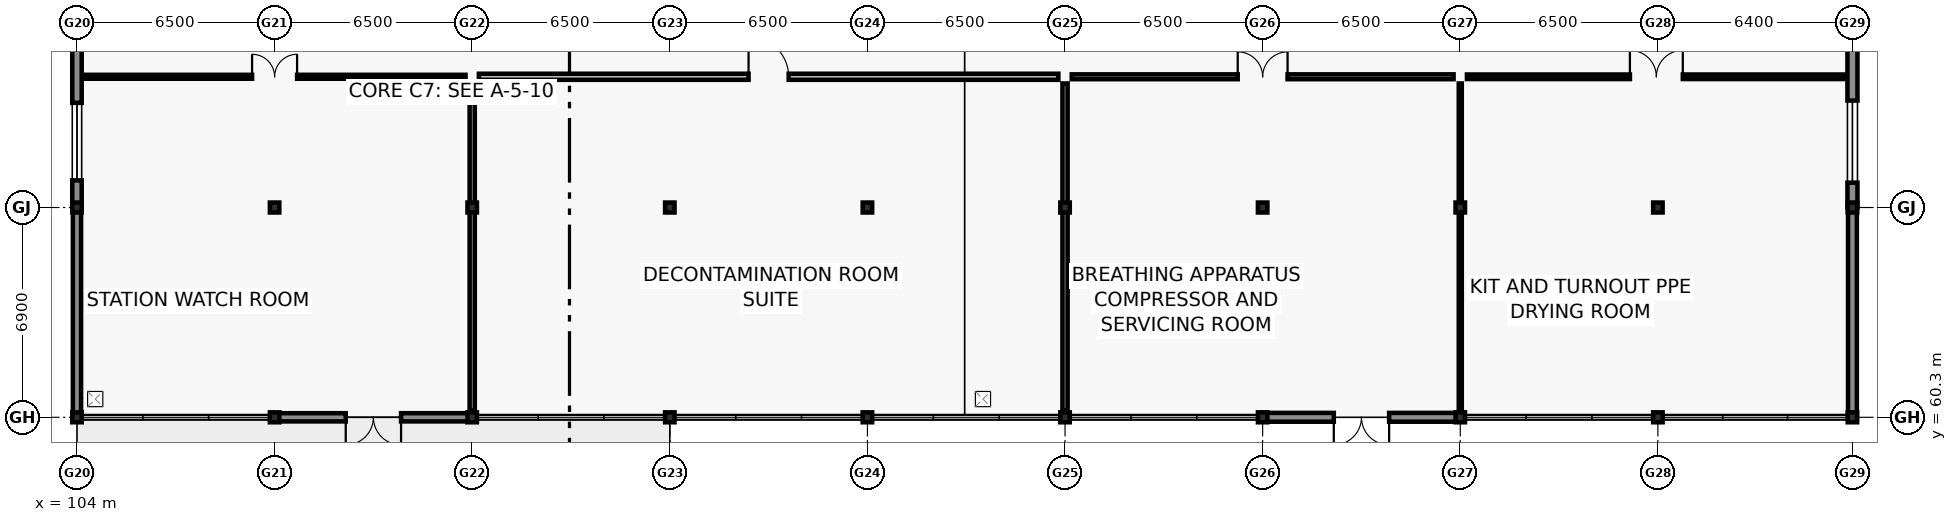
"""IFC4 building model, lengths in metres.
Left out: names, types, materials, properties, quantities, classifications, styles, units other than length and angle.
Written with IfcOpenShell. Run it as: python <this file> out.ifc"""

import sys

from ifc_helpers import new_model, si_unit, direction, frame, frame_2d, origin, origin_2d, place, context, subcontext, project, spatial, rectangle, i_section, extrude, element, fill, save


model = new_model("IFC4")
c1 = context("Model", 3, precision=1e-05, world=origin(), true_north=direction((0.0, 1.0)))
c2 = subcontext(c1, "Body", "Model", "MODEL_VIEW")
j1 = project(units=[si_unit("LENGTHUNIT", "METRE"), si_unit("PLANEANGLEUNIT", "RADIAN")], contexts=[c1])
p1 = place(None, origin())
s1 = spatial("IfcSite", under=j1, at=p1, CompositionType="ELEMENT")
p2 = place(p1, origin())
s2 = spatial("IfcBuilding", under=s1, at=p2, CompositionType="ELEMENT")
p3 = place(p2, origin())
s3 = spatial("IfcBuildingStorey", under=s2, at=p3, CompositionType="ELEMENT", Elevation=0.0)
for number, where, z_axis, x_axis in (
    (1, (104.0, 60.3, 0.0), (0.0, 0.0, 1.0), (1.0, 0.0, 0.0)),
    (2, (104.0, 67.2, 0.0), (0.0, 0.0, 1.0), (1.0, 0.0, 0.0)),
    (3, (110.5, 60.3, 0.0), (0.0, 0.0, 1.0), (1.0, 0.0, 0.0)),
    (4, (110.5, 67.2, 0.0), (0.0, 0.0, 1.0), (1.0, 0.0, 0.0)),
    (5, (117.0, 60.3, 0.0), (0.0, 0.0, 1.0), (1.0, 0.0, 0.0)),
    (6, (117.0, 67.2, 0.0), (0.0, 0.0, 1.0), (1.0, 0.0, 0.0)),
    (7, (123.5, 60.3, 0.0), (0.0, 0.0, 1.0), (1.0, 0.0, 0.0)),
    (8, (123.5, 67.2, 0.0), (0.0, 0.0, 1.0), (1.0, 0.0, 0.0)),
    (9, (130.0, 60.3, 0.0), (0.0, 0.0, 1.0), (1.0, 0.0, 0.0)),
    (10, (130.0, 67.2, 0.0), (0.0, 0.0, 1.0), (1.0, 0.0, 0.0)),
    (11, (136.5, 60.3, 0.0), (0.0, 0.0, 1.0), (1.0, 0.0, 0.0)),
    (12, (136.5, 67.2, 0.0), (0.0, 0.0, 1.0), (1.0, 0.0, 0.0)),
    (13, (143.0, 60.3, 0.0), (0.0, 0.0, 1.0), (1.0, 0.0, 0.0)),
    (14, (143.0, 67.2, 0.0), (0.0, 0.0, 1.0), (1.0, 0.0, 0.0)),
    (15, (149.5, 60.3, 0.0), (0.0, 0.0, 1.0), (1.0, 0.0, 0.0)),
    (16, (149.5, 67.2, 0.0), (0.0, 0.0, 1.0), (1.0, 0.0, 0.0)),
    (17, (156.0, 60.3, 0.0), (0.0, 0.0, 1.0), (1.0, 0.0, 0.0)),
    (18, (156.0, 67.2, 0.0), (0.0, 0.0, 1.0), (1.0, 0.0, 0.0)),
    (19, (162.4, 60.3, 0.0), (0.0, 0.0, 1.0), (1.0, 0.0, 0.0)),
    (20, (162.4, 67.2, 0.0), (0.0, 0.0, 1.0), (1.0, 0.0, 0.0)),
):
    element("IfcColumn", number, at=place(p3, frame(where, z_axis=z_axis, x_axis=x_axis)), inside=s3, PredefinedType="COLUMN", context=c2, shape_type="SweptSolid", body=[
        extrude(i_section(OverallWidth=0.311, OverallDepth=0.327, WebThickness=0.016, FlangeThickness=0.025, FilletRadius=0.017, at=origin_2d()), origin(), (0.0, 0.0, 1.0), 5.4),
    ])
p4 = place(p3, frame((116.995, 60.3, 0.0), z_axis=(0.0, 0.0, 1.0), x_axis=(-1.0, 0.0, 0.0)))
e21 = element("IfcWall", 21, at=p4, inside=s3, PredefinedType="SOLIDWALL", context=c2, shape_type="SweptSolid", body=[
    extrude(rectangle(XDim=6.49, YDim=0.27, at=frame_2d((3.245, 0.0))), origin(), (0.0, 0.0, 1.0), 4.52),
])
p5 = place(p4, frame((2.335, 0.0, 0.0)))
e22 = element("IfcOpeningElement", 22, at=p5, cuts=e21, PredefinedType="OPENING", context=c2, shape_type="SweptSolid", body=[
    extrude(rectangle(XDim=1.82, YDim=2.2, at=frame_2d((0.91, 1.1))), frame((0.0, 0.145, 0.0), z_axis=(0.0, -1.0, 0.0), x_axis=(1.0, 0.0, 0.0)), (0.0, 0.0, 1.0), 0.29),
])
p6 = place(p3, frame((149.495, 60.3, 0.0), z_axis=(0.0, 0.0, 1.0), x_axis=(-1.0, 0.0, 0.0)))
e23 = element("IfcWall", 23, at=p6, inside=s3, PredefinedType="SOLIDWALL", context=c2, shape_type="SweptSolid", body=[
    extrude(rectangle(XDim=6.49, YDim=0.29, at=frame_2d((3.245, 0.0))), origin(), (0.0, 0.0, 1.0), 4.52),
])
p7 = place(p6, frame((2.335, 0.0, 0.0)))
e24 = element("IfcOpeningElement", 24, at=p7, cuts=e23, PredefinedType="OPENING", context=c2, shape_type="SweptSolid", body=[
    extrude(rectangle(XDim=1.82, YDim=2.2, at=frame_2d((0.91, 1.1))), frame((0.0, 0.155, 0.0), z_axis=(0.0, -1.0, 0.0), x_axis=(1.0, 0.0, 0.0)), (0.0, 0.0, 1.0), 0.31),
])
p8 = place(p3, frame((104.0, 60.305, 0.0), z_axis=(0.0, 0.0, 1.0), x_axis=(0.0, 1.0, 0.0)))
e25 = element("IfcWall", 25, at=p8, inside=s3, PredefinedType="SOLIDWALL", context=c2, shape_type="SweptSolid", body=[
    extrude(rectangle(XDim=6.89, YDim=0.27, at=frame_2d((3.445, 0.0))), origin(), (0.0, 0.0, 1.0), 4.52),
])
p9 = place(p3, frame((162.4, 67.195, 0.0), z_axis=(0.0, 0.0, 1.0), x_axis=(0.0, -1.0, 0.0)))
e26 = element("IfcWall", 26, at=p9, inside=s3, PredefinedType="SOLIDWALL", context=c2, shape_type="SweptSolid", body=[
    extrude(rectangle(XDim=6.89, YDim=0.29, at=frame_2d((3.445, 0.0))), origin(), (0.0, 0.0, 1.0), 4.52),
])
p10 = place(p3, frame((104.0, 67.205, 0.0), z_axis=(0.0, 0.0, 1.0), x_axis=(0.0, 1.0, 0.0)))
e27 = element("IfcWall", 27, at=p10, inside=s3, PredefinedType="SOLIDWALL", context=c2, shape_type="SweptSolid", body=[
    extrude(rectangle(XDim=6.89, YDim=0.31, at=frame_2d((3.445, 0.0))), origin(), (0.0, 0.0, 1.0), 4.52),
])
p11 = place(p10, frame((0.887, 0.0, 0.8)))
e28 = element("IfcOpeningElement", 28, at=p11, cuts=e27, PredefinedType="OPENING", context=c2, shape_type="SweptSolid", body=[
    extrude(rectangle(XDim=2.55, YDim=2.1, at=frame_2d((1.275, 1.05))), frame((0.0, 0.165, 0.0), z_axis=(0.0, -1.0, 0.0), x_axis=(1.0, 0.0, 0.0)), (0.0, 0.0, 1.0), 0.33),
])
p12 = place(p3, frame((162.4, 74.095, 0.0), z_axis=(0.0, 0.0, 1.0), x_axis=(0.0, -1.0, 0.0)))
e29 = element("IfcWall", 29, at=p12, inside=s3, PredefinedType="SOLIDWALL", context=c2, shape_type="SweptSolid", body=[
    extrude(rectangle(XDim=6.89, YDim=0.33, at=frame_2d((3.445, 0.0))), origin(), (0.0, 0.0, 1.0), 4.52),
])
p13 = place(p12, frame((3.377, 0.0, 0.8)))
e30 = element("IfcOpeningElement", 30, at=p13, cuts=e29, PredefinedType="OPENING", context=c2, shape_type="SweptSolid", body=[
    extrude(rectangle(XDim=2.7, YDim=2.1, at=frame_2d((1.35, 1.05))), frame((0.0, 0.175, 0.0), z_axis=(0.0, -1.0, 0.0), x_axis=(1.0, 0.0, 0.0)), (0.0, 0.0, 1.0), 0.35),
])
p14 = place(p3, frame((117.0, 60.52, 0.0), z_axis=(0.0, 0.0, 1.0), x_axis=(0.0, 1.0, 0.0)))
e31 = element("IfcWall", 31, at=p14, inside=s3, PredefinedType="PARTITIONING", context=c2, shape_type="SweptSolid", body=[
    extrude(rectangle(XDim=10.76, YDim=0.17, at=frame_2d((5.38, 0.0))), origin(), (0.0, 0.0, 1.0), 4.5),
])
p15 = place(p3, frame((104.22, 71.5, 0.0), z_axis=(0.0, 0.0, 1.0), x_axis=(1.0, 0.0, 0.0)))
e32 = element("IfcWall", 32, at=p15, inside=s3, PredefinedType="PARTITIONING", context=c2, shape_type="SweptSolid", body=[
    extrude(rectangle(XDim=12.56, YDim=0.13, at=frame_2d((6.28, 0.0))), origin(), (0.0, 0.0, 1.0), 4.5),
])
p16 = place(p15, frame((5.54, 0.0, 0.0)))
e33 = element("IfcOpeningElement", 33, at=p16, cuts=e32, PredefinedType="OPENING", context=c2, shape_type="SweptSolid", body=[
    extrude(rectangle(XDim=1.48, YDim=2.18, at=frame_2d((0.74, 1.09))), frame((0.0, 0.075, 0.0), z_axis=(0.0, -1.0, 0.0), x_axis=(1.0, 0.0, 0.0)), (0.0, 0.0, 1.0), 0.15),
])
p17 = place(p3, frame((136.5, 60.52, 0.0), z_axis=(0.0, 0.0, 1.0), x_axis=(0.0, 1.0, 0.0)))
e34 = element("IfcWall", 34, at=p17, inside=s3, PredefinedType="PARTITIONING", context=c2, shape_type="SweptSolid", body=[
    extrude(rectangle(XDim=10.76, YDim=0.17, at=frame_2d((5.38, 0.0))), origin(), (0.0, 0.0, 1.0), 4.5),
])
p18 = place(p3, frame((117.22, 71.5, 0.0), z_axis=(0.0, 0.0, 1.0), x_axis=(1.0, 0.0, 0.0)))
e35 = element("IfcWall", 35, at=p18, inside=s3, PredefinedType="PARTITIONING", context=c2, shape_type="SweptSolid", body=[
    extrude(rectangle(XDim=19.06, YDim=0.2, at=frame_2d((9.53, 0.0))), origin(), (0.0, 0.0, 1.0), 4.5),
])
p19 = place(p18, frame((8.87, 0.0, 0.0)))
e36 = element("IfcOpeningElement", 36, at=p19, cuts=e35, PredefinedType="OPENING", context=c2, shape_type="SweptSolid", body=[
    extrude(rectangle(XDim=1.32, YDim=2.12, at=frame_2d((0.66, 1.06))), frame((0.0, 0.11, 0.0), z_axis=(0.0, -1.0, 0.0), x_axis=(1.0, 0.0, 0.0)), (0.0, 0.0, 1.0), 0.22),
])
p20 = place(p3, frame((149.5, 60.52, 0.0), z_axis=(0.0, 0.0, 1.0), x_axis=(0.0, 1.0, 0.0)))
e37 = element("IfcWall", 37, at=p20, inside=s3, PredefinedType="PARTITIONING", context=c2, shape_type="SweptSolid", body=[
    extrude(rectangle(XDim=10.76, YDim=0.1, at=frame_2d((5.38, 0.0))), origin(), (0.0, 0.0, 1.0), 4.5),
])
p21 = place(p3, frame((136.72, 71.5, 0.0), z_axis=(0.0, 0.0, 1.0), x_axis=(1.0, 0.0, 0.0)))
e38 = element("IfcWall", 38, at=p21, inside=s3, PredefinedType="PARTITIONING", context=c2, shape_type="SweptSolid", body=[
    extrude(rectangle(XDim=12.56, YDim=0.16, at=frame_2d((6.28, 0.0))), origin(), (0.0, 0.0, 1.0), 4.5),
])
p22 = place(p21, frame((5.46, 0.0, 0.0)))
e39 = element("IfcOpeningElement", 39, at=p22, cuts=e38, PredefinedType="OPENING", context=c2, shape_type="SweptSolid", body=[
    extrude(rectangle(XDim=1.64, YDim=2.2, at=frame_2d((0.82, 1.1))), frame((0.0, 0.09, 0.0), z_axis=(0.0, -1.0, 0.0), x_axis=(1.0, 0.0, 0.0)), (0.0, 0.0, 1.0), 0.18),
])
p23 = place(p3, frame((149.72, 71.5, 0.0), z_axis=(0.0, 0.0, 1.0), x_axis=(1.0, 0.0, 0.0)))
e40 = element("IfcWall", 40, at=p23, inside=s3, PredefinedType="PARTITIONING", context=c2, shape_type="SweptSolid", body=[
    extrude(rectangle(XDim=12.46, YDim=0.15, at=frame_2d((6.23, 0.0))), origin(), (0.0, 0.0, 1.0), 4.5),
])
p24 = place(p23, frame((5.36, 0.0, 0.0)))
e41 = element("IfcOpeningElement", 41, at=p24, cuts=e40, PredefinedType="OPENING", context=c2, shape_type="SweptSolid", body=[
    extrude(rectangle(XDim=1.74, YDim=2.2, at=frame_2d((0.87, 1.1))), frame((0.0, 0.085, 0.0), z_axis=(0.0, -1.0, 0.0), x_axis=(1.0, 0.0, 0.0)), (0.0, 0.0, 1.0), 0.17),
])
p25 = place(p5, origin())
e42 = element("IfcDoor", 42, at=p25, inside=s3, OperationType="DOUBLE_DOOR_SINGLE_SWING", PredefinedType="DOOR", context=c2, shape_type="SweptSolid", body=[
    extrude(rectangle(XDim=1.82, YDim=2.2, at=frame_2d((0.91, 1.1))), frame((0.0, 0.025, 0.0), z_axis=(0.0, -1.0, 0.0), x_axis=(1.0, 0.0, 0.0)), (0.0, 0.0, 1.0), 0.05),
])
fill(e22, e42)
p26 = place(p7, origin())
e43 = element("IfcDoor", 43, at=p26, inside=s3, OperationType="DOUBLE_DOOR_SINGLE_SWING", PredefinedType="DOOR", context=c2, shape_type="SweptSolid", body=[
    extrude(rectangle(XDim=1.82, YDim=2.2, at=frame_2d((0.91, 1.1))), frame((0.0, 0.025, 0.0), z_axis=(0.0, -1.0, 0.0), x_axis=(1.0, 0.0, 0.0)), (0.0, 0.0, 1.0), 0.05),
])
fill(e24, e43)
p27 = place(p11, origin())
e44 = element("IfcWindow", 44, at=p27, inside=s3, PartitioningType="TRIPLE_PANEL_VERTICAL", PredefinedType="WINDOW", context=c2, shape_type="SweptSolid", body=[
    extrude(rectangle(XDim=2.55, YDim=2.1, at=frame_2d((1.275, 1.05))), frame((0.0, 0.03, 0.0), z_axis=(0.0, -1.0, 0.0), x_axis=(1.0, 0.0, 0.0)), (0.0, 0.0, 1.0), 0.06),
])
fill(e28, e44)
p28 = place(p13, origin())
e45 = element("IfcWindow", 45, at=p28, inside=s3, PartitioningType="TRIPLE_PANEL_VERTICAL", PredefinedType="WINDOW", context=c2, shape_type="SweptSolid", body=[
    extrude(rectangle(XDim=2.7, YDim=2.1, at=frame_2d((1.35, 1.05))), frame((0.0, 0.03, 0.0), z_axis=(0.0, -1.0, 0.0), x_axis=(1.0, 0.0, 0.0)), (0.0, 0.0, 1.0), 0.06),
])
fill(e30, e45)
p29 = place(p16, origin())
e46 = element("IfcDoor", 46, at=p29, inside=s3, OperationType="DOUBLE_DOOR_SINGLE_SWING", PredefinedType="DOOR", context=c2, shape_type="SweptSolid", body=[
    extrude(rectangle(XDim=1.48, YDim=2.18, at=frame_2d((0.74, 1.09))), frame((0.0, 0.025, 0.0), z_axis=(0.0, -1.0, 0.0), x_axis=(1.0, 0.0, 0.0)), (0.0, 0.0, 1.0), 0.05),
])
fill(e33, e46)
p30 = place(p19, origin())
e47 = element("IfcDoor", 47, at=p30, inside=s3, OperationType="SINGLE_SWING_LEFT", PredefinedType="DOOR", context=c2, shape_type="SweptSolid", body=[
    extrude(rectangle(XDim=1.32, YDim=2.12, at=frame_2d((0.66, 1.06))), frame((0.0, 0.025, 0.0), z_axis=(0.0, -1.0, 0.0), x_axis=(1.0, 0.0, 0.0)), (0.0, 0.0, 1.0), 0.05),
])
fill(e36, e47)
p31 = place(p22, origin())
e48 = element("IfcDoor", 48, at=p31, inside=s3, OperationType="DOUBLE_DOOR_SINGLE_SWING", PredefinedType="DOOR", context=c2, shape_type="SweptSolid", body=[
    extrude(rectangle(XDim=1.64, YDim=2.2, at=frame_2d((0.82, 1.1))), frame((0.0, 0.025, 0.0), z_axis=(0.0, -1.0, 0.0), x_axis=(1.0, 0.0, 0.0)), (0.0, 0.0, 1.0), 0.05),
])
fill(e39, e48)
p32 = place(p24, origin())
e49 = element("IfcDoor", 49, at=p32, inside=s3, OperationType="DOUBLE_DOOR_SINGLE_SWING", PredefinedType="DOOR", context=c2, shape_type="SweptSolid", body=[
    extrude(rectangle(XDim=1.74, YDim=2.2, at=frame_2d((0.87, 1.1))), frame((0.0, 0.025, 0.0), z_axis=(0.0, -1.0, 0.0), x_axis=(1.0, 0.0, 0.0)), (0.0, 0.0, 1.0), 0.05),
])
fill(e41, e49)
save(model, sys.argv[1])
